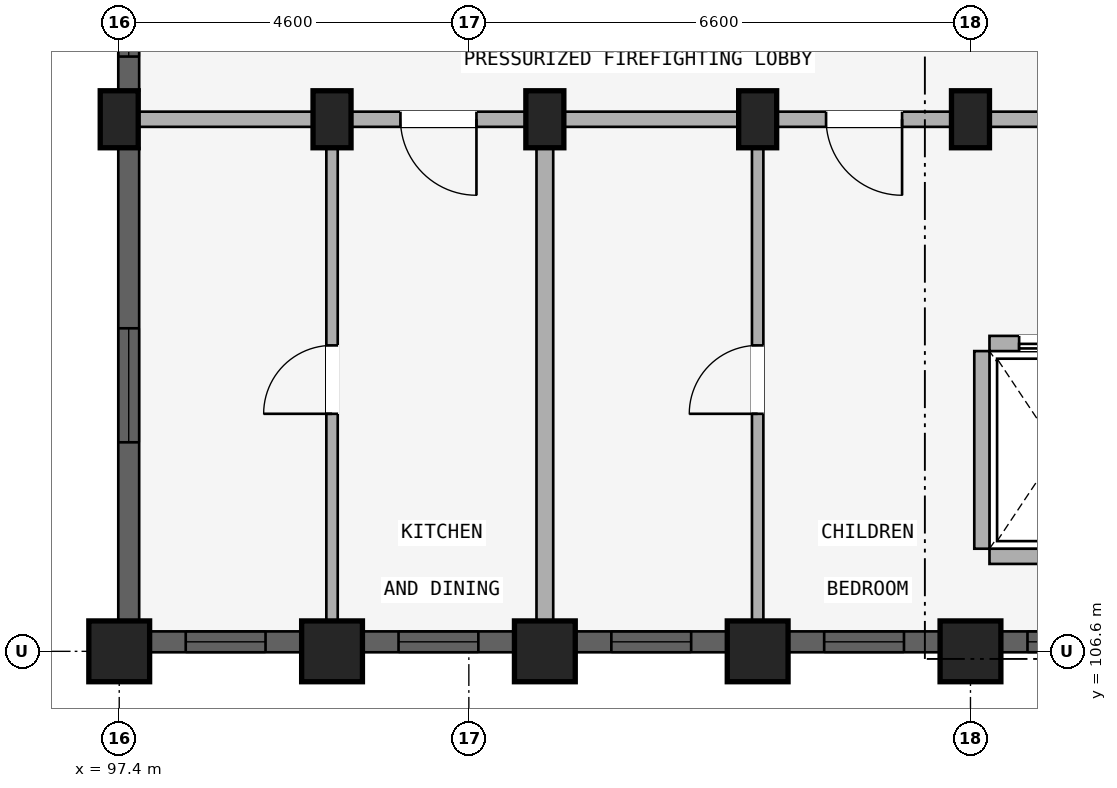
"""IFC4 building model, lengths in metres.
Left out: names, types, materials, properties, quantities, classifications, styles, units other than length and angle.
Written with IfcOpenShell. Run it as: python <this file> out.ifc"""

import sys

from ifc_helpers import new_model, si_unit, direction, frame, frame_2d, origin, origin_2d, place, context, subcontext, project, spatial, rectangle, extrude, element, fill, save


model = new_model("IFC4")
c1 = context("Model", 3, precision=1e-05, world=origin(), true_north=direction((0.0, 1.0)))
c2 = subcontext(c1, "Body", "Model", "MODEL_VIEW")
j1 = project(units=[si_unit("LENGTHUNIT", "METRE"), si_unit("PLANEANGLEUNIT", "RADIAN")], contexts=[c1])
p1 = place(None, origin())
s1 = spatial("IfcSite", under=j1, at=p1, CompositionType="ELEMENT")
p2 = place(p1, origin())
s2 = spatial("IfcBuilding", under=s1, at=p2, CompositionType="ELEMENT")
p3 = place(p2, frame((0.0, 0.0, 8.7)))
s3 = spatial("IfcBuildingStorey", under=s2, at=p3, CompositionType="ELEMENT", Elevation=8.7)
p4 = place(p3, frame((108.6, 106.6, 0.0), z_axis=(0.0, 0.0, 1.0), x_axis=(1.0, 0.0, 0.0)))
e1 = element("IfcColumn", 1, at=p4, inside=s3, PredefinedType="COLUMN", context=c2, shape_type="SweptSolid", body=[
    extrude(rectangle(XDim=0.8, YDim=0.8, at=origin_2d()), origin(), (0.0, 0.0, 1.0), 2.93),
])
p5 = place(p3, frame((108.6, 113.6, 0.0), z_axis=(0.0, 0.0, 1.0), x_axis=(1.0, 0.0, 0.0)))
e2 = element("IfcColumn", 2, at=p5, inside=s3, PredefinedType="COLUMN", context=c2, shape_type="SweptSolid", body=[
    extrude(rectangle(XDim=0.5, YDim=0.75, at=origin_2d()), origin(), (0.0, 0.0, 1.0), 2.93),
])
p6 = place(p3, frame((105.8, 106.6, 0.0), z_axis=(0.0, 0.0, 1.0), x_axis=(1.0, 0.0, 0.0)))
e3 = element("IfcColumn", 3, at=p6, inside=s3, PredefinedType="COLUMN", context=c2, shape_type="SweptSolid", body=[
    extrude(rectangle(XDim=0.8, YDim=0.8, at=origin_2d()), origin(), (0.0, 0.0, 1.0), 2.93),
])
p7 = place(p3, frame((105.8, 113.6, 0.0), z_axis=(0.0, 0.0, 1.0), x_axis=(1.0, 0.0, 0.0)))
e4 = element("IfcColumn", 4, at=p7, inside=s3, PredefinedType="COLUMN", context=c2, shape_type="SweptSolid", body=[
    extrude(rectangle(XDim=0.5, YDim=0.75, at=origin_2d()), origin(), (0.0, 0.0, 1.0), 2.93),
])
p8 = place(p3, frame((103.0, 106.6, 0.0), z_axis=(0.0, 0.0, 1.0), x_axis=(1.0, 0.0, 0.0)))
e5 = element("IfcColumn", 5, at=p8, inside=s3, PredefinedType="COLUMN", context=c2, shape_type="SweptSolid", body=[
    extrude(rectangle(XDim=0.8, YDim=0.8, at=origin_2d()), origin(), (0.0, 0.0, 1.0), 2.93),
])
p9 = place(p3, frame((103.0, 113.6, 0.0), z_axis=(0.0, 0.0, 1.0), x_axis=(1.0, 0.0, 0.0)))
e6 = element("IfcColumn", 6, at=p9, inside=s3, PredefinedType="COLUMN", context=c2, shape_type="SweptSolid", body=[
    extrude(rectangle(XDim=0.5, YDim=0.75, at=origin_2d()), origin(), (0.0, 0.0, 1.0), 2.93),
])
p10 = place(p3, frame((100.2, 106.6, 0.0), z_axis=(0.0, 0.0, 1.0), x_axis=(1.0, 0.0, 0.0)))
e7 = element("IfcColumn", 7, at=p10, inside=s3, PredefinedType="COLUMN", context=c2, shape_type="SweptSolid", body=[
    extrude(rectangle(XDim=0.8, YDim=0.8, at=origin_2d()), origin(), (0.0, 0.0, 1.0), 2.93),
])
p11 = place(p3, frame((100.2, 113.6, 0.0), z_axis=(0.0, 0.0, 1.0), x_axis=(1.0, 0.0, 0.0)))
e8 = element("IfcColumn", 8, at=p11, inside=s3, PredefinedType="COLUMN", context=c2, shape_type="SweptSolid", body=[
    extrude(rectangle(XDim=0.5, YDim=0.75, at=origin_2d()), origin(), (0.0, 0.0, 1.0), 2.93),
])
p12 = place(p3, frame((97.4, 106.6, 0.0), z_axis=(0.0, 0.0, 1.0), x_axis=(1.0, 0.0, 0.0)))
e9 = element("IfcColumn", 9, at=p12, inside=s3, PredefinedType="COLUMN", context=c2, shape_type="SweptSolid", body=[
    extrude(rectangle(XDim=0.8, YDim=0.8, at=origin_2d()), origin(), (0.0, 0.0, 1.0), 2.93),
])
p13 = place(p3, frame((97.4, 113.6, 0.0), z_axis=(0.0, 0.0, 1.0), x_axis=(1.0, 0.0, 0.0)))
e10 = element("IfcColumn", 10, at=p13, inside=s3, PredefinedType="COLUMN", context=c2, shape_type="SweptSolid", body=[
    extrude(rectangle(XDim=0.5, YDim=0.75, at=origin_2d()), origin(), (0.0, 0.0, 1.0), 2.93),
])
p14 = place(p3, frame((108.75, 107.95, 0.0), z_axis=(0.0, 0.0, 1.0), x_axis=(0.0, 1.0, 0.0)))
e11 = element("IfcWall", 11, at=p14, inside=s3, PredefinedType="STANDARD", context=c2, shape_type="SweptSolid", body=[
    extrude(rectangle(XDim=2.6, YDim=0.2, at=frame_2d((1.3, 0.0))), origin(), (0.0, 0.0, 1.0), 2.372),
])
p15 = place(p3, frame((110.65, 107.85, 0.0), z_axis=(0.0, 0.0, 1.0), x_axis=(-1.0, 0.0, 0.0)))
e12 = element("IfcWall", 12, at=p15, inside=s3, PredefinedType="STANDARD", context=c2, shape_type="SweptSolid", body=[
    extrude(rectangle(XDim=1.8, YDim=0.2, at=frame_2d((0.9, 0.0))), origin(), (0.0, 0.0, 1.0), 2.93),
])
p16 = place(p3, frame((110.65, 110.65, 0.0), z_axis=(0.0, 0.0, 1.0), x_axis=(-1.0, 0.0, 0.0)))
e13 = element("IfcWall", 13, at=p16, inside=s3, PredefinedType="STANDARD", context=c2, shape_type="SweptSolid", body=[
    extrude(rectangle(XDim=1.8, YDim=0.2, at=frame_2d((0.9, 0.0))), origin(), (0.0, 0.0, 1.0), 2.93),
])
p17 = place(p16, frame((0.39, 0.0, 0.0)))
e14 = element("IfcOpeningElement", 14, at=p17, cuts=e13, PredefinedType="OPENING", context=c2, shape_type="SweptSolid", body=[
    extrude(rectangle(XDim=1.02, YDim=2.15, at=frame_2d((0.51, 1.075))), frame((0.0, 0.11, 0.0), z_axis=(0.0, -1.0, 0.0), x_axis=(1.0, 0.0, 0.0)), (0.0, 0.0, 1.0), 0.22),
])
p18 = place(p3, frame((114.25, 113.6, 0.0), z_axis=(0.0, 0.0, 1.0), x_axis=(-1.0, 0.0, 0.0)))
e15 = element("IfcWall", 15, at=p18, inside=s3, PredefinedType="STANDARD", context=c2, shape_type="SweptSolid", body=[
    extrude(rectangle(XDim=5.6, YDim=0.2, at=frame_2d((2.8, 0.0))), origin(), (0.0, 0.0, 1.0), 2.372),
])
p19 = place(p18, frame((1.91, 0.0, 0.0)))
e16 = element("IfcOpeningElement", 16, at=p19, cuts=e15, PredefinedType="OPENING", context=c2, shape_type="SweptSolid", body=[
    extrude(rectangle(XDim=1.22, YDim=2.15, at=frame_2d((0.61, 1.075))), frame((0.0, 0.11, 0.0), z_axis=(0.0, -1.0, 0.0), x_axis=(1.0, 0.0, 0.0)), (0.0, 0.0, 1.0), 0.22),
])
p20 = place(p3, frame((108.6, 113.6, 0.0), z_axis=(0.0, 0.0, 1.0), x_axis=(-1.0, 0.0, 0.0)))
e17 = element("IfcWall", 17, at=p20, inside=s3, PredefinedType="STANDARD", context=c2, shape_type="SweptSolid", body=[
    extrude(rectangle(XDim=2.8, YDim=0.2, at=frame_2d((1.4, 0.0))), origin(), (0.0, 0.0, 1.0), 2.372),
])
p21 = place(p20, frame((0.9, 0.0, 0.0)))
e18 = element("IfcOpeningElement", 18, at=p21, cuts=e17, PredefinedType="OPENING", context=c2, shape_type="SweptSolid", body=[
    extrude(rectangle(XDim=1.0, YDim=2.15, at=frame_2d((0.5, 1.075))), frame((0.0, 0.11, 0.0), z_axis=(0.0, -1.0, 0.0), x_axis=(1.0, 0.0, 0.0)), (0.0, 0.0, 1.0), 0.22),
])
p22 = place(p3, frame((105.8, 113.6, 0.0), z_axis=(0.0, 0.0, 1.0), x_axis=(-1.0, 0.0, 0.0)))
e19 = element("IfcWall", 19, at=p22, inside=s3, PredefinedType="STANDARD", context=c2, shape_type="SweptSolid", body=[
    extrude(rectangle(XDim=2.8, YDim=0.2, at=frame_2d((1.4, 0.0))), origin(), (0.0, 0.0, 1.0), 2.372),
])
p23 = place(p3, frame((103.0, 113.6, 0.0), z_axis=(0.0, 0.0, 1.0), x_axis=(-1.0, 0.0, 0.0)))
e20 = element("IfcWall", 20, at=p23, inside=s3, PredefinedType="STANDARD", context=c2, shape_type="SweptSolid", body=[
    extrude(rectangle(XDim=2.8, YDim=0.2, at=frame_2d((1.4, 0.0))), origin(), (0.0, 0.0, 1.0), 2.372),
])
p24 = place(p23, frame((0.9, 0.0, 0.0)))
e21 = element("IfcOpeningElement", 21, at=p24, cuts=e20, PredefinedType="OPENING", context=c2, shape_type="SweptSolid", body=[
    extrude(rectangle(XDim=1.0, YDim=2.15, at=frame_2d((0.5, 1.075))), frame((0.0, 0.11, 0.0), z_axis=(0.0, -1.0, 0.0), x_axis=(1.0, 0.0, 0.0)), (0.0, 0.0, 1.0), 0.22),
])
p25 = place(p3, frame((100.2, 113.6, 0.0), z_axis=(0.0, 0.0, 1.0), x_axis=(-1.0, 0.0, 0.0)))
e22 = element("IfcWall", 22, at=p25, inside=s3, PredefinedType="STANDARD", context=c2, shape_type="SweptSolid", body=[
    extrude(rectangle(XDim=2.8, YDim=0.2, at=frame_2d((1.4, 0.0))), origin(), (0.0, 0.0, 1.0), 2.372),
])
p26 = place(p3, frame((105.8, 106.8, 0.0), z_axis=(0.0, 0.0, 1.0), x_axis=(0.0, 1.0, 0.0)))
e23 = element("IfcWall", 23, at=p26, inside=s3, PredefinedType="PARTITIONING", context=c2, shape_type="SweptSolid", body=[
    extrude(rectangle(XDim=6.75, YDim=0.15, at=frame_2d((3.375, 0.0))), origin(), (0.0, 0.0, 1.0), 2.372),
])
p27 = place(p26, frame((2.925, 0.0, 0.0)))
e24 = element("IfcOpeningElement", 24, at=p27, cuts=e23, PredefinedType="OPENING", context=c2, shape_type="SweptSolid", body=[
    extrude(rectangle(XDim=0.9, YDim=2.1, at=frame_2d((0.45, 1.05))), frame((0.0, 0.085, 0.0), z_axis=(0.0, -1.0, 0.0), x_axis=(1.0, 0.0, 0.0)), (0.0, 0.0, 1.0), 0.17),
])
p28 = place(p3, frame((103.0, 106.8, 0.0), z_axis=(0.0, 0.0, 1.0), x_axis=(0.0, 1.0, 0.0)))
e25 = element("IfcWall", 25, at=p28, inside=s3, PredefinedType="STANDARD", context=c2, shape_type="SweptSolid", body=[
    extrude(rectangle(XDim=6.75, YDim=0.22, at=frame_2d((3.375, 0.0))), origin(), (0.0, 0.0, 1.0), 2.372),
])
p29 = place(p3, frame((100.2, 106.8, 0.0), z_axis=(0.0, 0.0, 1.0), x_axis=(0.0, 1.0, 0.0)))
e26 = element("IfcWall", 26, at=p29, inside=s3, PredefinedType="PARTITIONING", context=c2, shape_type="SweptSolid", body=[
    extrude(rectangle(XDim=6.75, YDim=0.15, at=frame_2d((3.375, 0.0))), origin(), (0.0, 0.0, 1.0), 2.372),
])
p30 = place(p29, frame((2.925, 0.0, 0.0)))
e27 = element("IfcOpeningElement", 27, at=p30, cuts=e26, PredefinedType="OPENING", context=c2, shape_type="SweptSolid", body=[
    extrude(rectangle(XDim=0.9, YDim=2.1, at=frame_2d((0.45, 1.05))), frame((0.0, 0.085, 0.0), z_axis=(0.0, -1.0, 0.0), x_axis=(1.0, 0.0, 0.0)), (0.0, 0.0, 1.0), 0.17),
])
p31 = place(p3, frame((111.372, 106.725, 0.0), z_axis=(0.0, 0.0, 1.0), x_axis=(-1.0, 0.0, 0.0)))
e28 = element("IfcWall", 28, at=p31, inside=s3, PredefinedType="STANDARD", context=c2, shape_type="SweptSolid", body=[
    extrude(rectangle(XDim=2.422, YDim=0.275, at=frame_2d((1.211, 0.0))), origin(), (0.0, 0.0, 1.0), 2.472),
])
p32 = place(p31, frame((0.822, 0.0, 0.772)))
e29 = element("IfcOpeningElement", 29, at=p32, cuts=e28, PredefinedType="OPENING", context=c2, shape_type="SweptSolid", body=[
    extrude(rectangle(XDim=1.2, YDim=1.5, at=frame_2d((0.6, 0.75))), frame((0.0, 0.147, 0.0), z_axis=(0.0, -1.0, 0.0), x_axis=(1.0, 0.0, 0.0)), (0.0, 0.0, 1.0), 0.295),
])
p33 = place(p3, frame((108.197, 106.725, 0.0), z_axis=(0.0, 0.0, 1.0), x_axis=(-1.0, 0.0, 0.0)))
e30 = element("IfcWall", 30, at=p33, inside=s3, PredefinedType="STANDARD", context=c2, shape_type="SweptSolid", body=[
    extrude(rectangle(XDim=1.993, YDim=0.275, at=frame_2d((0.997, 0.0))), origin(), (0.0, 0.0, 1.0), 2.472),
])
p34 = place(p33, frame((0.471, 0.0, 0.88)))
e31 = element("IfcOpeningElement", 31, at=p34, cuts=e30, PredefinedType="OPENING", context=c2, shape_type="SweptSolid", body=[
    extrude(rectangle(XDim=1.05, YDim=1.25, at=frame_2d((0.525, 0.625))), frame((0.0, 0.147, 0.0), z_axis=(0.0, -1.0, 0.0), x_axis=(1.0, 0.0, 0.0)), (0.0, 0.0, 1.0), 0.295),
])
p35 = place(p3, frame((105.396, 106.725, 0.0), z_axis=(0.0, 0.0, 1.0), x_axis=(-1.0, 0.0, 0.0)))
e32 = element("IfcWall", 32, at=p35, inside=s3, PredefinedType="STANDARD", context=c2, shape_type="SweptSolid", body=[
    extrude(rectangle(XDim=1.993, YDim=0.275, at=frame_2d((0.997, 0.0))), origin(), (0.0, 0.0, 1.0), 2.472),
])
p36 = place(p35, frame((0.471, 0.0, 0.88)))
e33 = element("IfcOpeningElement", 33, at=p36, cuts=e32, PredefinedType="OPENING", context=c2, shape_type="SweptSolid", body=[
    extrude(rectangle(XDim=1.05, YDim=1.25, at=frame_2d((0.525, 0.625))), frame((0.0, 0.147, 0.0), z_axis=(0.0, -1.0, 0.0), x_axis=(1.0, 0.0, 0.0)), (0.0, 0.0, 1.0), 0.295),
])
p37 = place(p3, frame((102.596, 106.725, 0.0), z_axis=(0.0, 0.0, 1.0), x_axis=(-1.0, 0.0, 0.0)))
e34 = element("IfcWall", 34, at=p37, inside=s3, PredefinedType="STANDARD", context=c2, shape_type="SweptSolid", body=[
    extrude(rectangle(XDim=1.993, YDim=0.275, at=frame_2d((0.997, 0.0))), origin(), (0.0, 0.0, 1.0), 2.472),
])
p38 = place(p37, frame((0.471, 0.0, 0.88)))
e35 = element("IfcOpeningElement", 35, at=p38, cuts=e34, PredefinedType="OPENING", context=c2, shape_type="SweptSolid", body=[
    extrude(rectangle(XDim=1.05, YDim=1.25, at=frame_2d((0.525, 0.625))), frame((0.0, 0.147, 0.0), z_axis=(0.0, -1.0, 0.0), x_axis=(1.0, 0.0, 0.0)), (0.0, 0.0, 1.0), 0.295),
])
p39 = place(p3, frame((99.796, 106.725, 0.0), z_axis=(0.0, 0.0, 1.0), x_axis=(-1.0, 0.0, 0.0)))
e36 = element("IfcWall", 36, at=p39, inside=s3, PredefinedType="STANDARD", context=c2, shape_type="SweptSolid", body=[
    extrude(rectangle(XDim=1.993, YDim=0.275, at=frame_2d((0.997, 0.0))), origin(), (0.0, 0.0, 1.0), 2.472),
])
p40 = place(p39, frame((0.471, 0.0, 0.88)))
e37 = element("IfcOpeningElement", 37, at=p40, cuts=e36, PredefinedType="OPENING", context=c2, shape_type="SweptSolid", body=[
    extrude(rectangle(XDim=1.05, YDim=1.25, at=frame_2d((0.525, 0.625))), frame((0.0, 0.147, 0.0), z_axis=(0.0, -1.0, 0.0), x_axis=(1.0, 0.0, 0.0)), (0.0, 0.0, 1.0), 0.295),
])
p41 = place(p3, frame((97.525, 107.003, 0.0), z_axis=(0.0, 0.0, 1.0), x_axis=(0.0, 1.0, 0.0)))
e38 = element("IfcWall", 38, at=p41, inside=s3, PredefinedType="STANDARD", context=c2, shape_type="SweptSolid", body=[
    extrude(rectangle(XDim=6.218, YDim=0.275, at=frame_2d((3.109, 0.0))), origin(), (0.0, 0.0, 1.0), 2.372),
])
p42 = place(p41, frame((2.346, 0.0, 0.522)))
e39 = element("IfcOpeningElement", 39, at=p42, cuts=e38, PredefinedType="OPENING", context=c2, shape_type="SweptSolid", body=[
    extrude(rectangle(XDim=1.5, YDim=1.65, at=frame_2d((0.75, 0.825))), frame((0.0, 0.147, 0.0), z_axis=(0.0, -1.0, 0.0), x_axis=(1.0, 0.0, 0.0)), (0.0, 0.0, 1.0), 0.295),
])
p43 = place(p3, frame((97.525, 113.979, 0.0), z_axis=(0.0, 0.0, 1.0), x_axis=(0.0, 1.0, 0.0)))
e40 = element("IfcWall", 40, at=p43, inside=s3, PredefinedType="STANDARD", context=c2, shape_type="SweptSolid", body=[
    extrude(rectangle(XDim=1.643, YDim=0.275, at=frame_2d((0.822, 0.0))), origin(), (0.0, 0.0, 1.0), 2.372),
])
p44 = place(p43, frame((0.447, 0.0, 0.88)))
e41 = element("IfcOpeningElement", 41, at=p44, cuts=e40, PredefinedType="OPENING", context=c2, shape_type="SweptSolid", body=[
    extrude(rectangle(XDim=0.75, YDim=1.05, at=frame_2d((0.375, 0.525))), frame((0.0, 0.147, 0.0), z_axis=(0.0, -1.0, 0.0), x_axis=(1.0, 0.0, 0.0)), (0.0, 0.0, 1.0), 0.295),
])
p45 = place(p32, origin())
e42 = element("IfcWindow", 42, at=p45, inside=s3, PartitioningType="SINGLE_PANEL", PredefinedType="WINDOW", context=c2, shape_type="SweptSolid", body=[
    extrude(rectangle(XDim=1.2, YDim=1.5, at=frame_2d((0.6, 0.75))), frame((0.0, 0.03, 0.0), z_axis=(0.0, -1.0, 0.0), x_axis=(1.0, 0.0, 0.0)), (0.0, 0.0, 1.0), 0.06),
])
fill(e29, e42)
p46 = place(p34, origin())
e43 = element("IfcWindow", 43, at=p46, inside=s3, PartitioningType="SINGLE_PANEL", PredefinedType="WINDOW", context=c2, shape_type="SweptSolid", body=[
    extrude(rectangle(XDim=1.05, YDim=1.25, at=frame_2d((0.525, 0.625))), frame((0.0, 0.03, 0.0), z_axis=(0.0, -1.0, 0.0), x_axis=(1.0, 0.0, 0.0)), (0.0, 0.0, 1.0), 0.06),
])
fill(e31, e43)
p47 = place(p36, origin())
e44 = element("IfcWindow", 44, at=p47, inside=s3, PartitioningType="SINGLE_PANEL", PredefinedType="WINDOW", context=c2, shape_type="SweptSolid", body=[
    extrude(rectangle(XDim=1.05, YDim=1.25, at=frame_2d((0.525, 0.625))), frame((0.0, 0.03, 0.0), z_axis=(0.0, -1.0, 0.0), x_axis=(1.0, 0.0, 0.0)), (0.0, 0.0, 1.0), 0.06),
])
fill(e33, e44)
p48 = place(p38, origin())
e45 = element("IfcWindow", 45, at=p48, inside=s3, PartitioningType="SINGLE_PANEL", PredefinedType="WINDOW", context=c2, shape_type="SweptSolid", body=[
    extrude(rectangle(XDim=1.05, YDim=1.25, at=frame_2d((0.525, 0.625))), frame((0.0, 0.03, 0.0), z_axis=(0.0, -1.0, 0.0), x_axis=(1.0, 0.0, 0.0)), (0.0, 0.0, 1.0), 0.06),
])
fill(e35, e45)
p49 = place(p40, origin())
e46 = element("IfcWindow", 46, at=p49, inside=s3, PartitioningType="SINGLE_PANEL", PredefinedType="WINDOW", context=c2, shape_type="SweptSolid", body=[
    extrude(rectangle(XDim=1.05, YDim=1.25, at=frame_2d((0.525, 0.625))), frame((0.0, 0.03, 0.0), z_axis=(0.0, -1.0, 0.0), x_axis=(1.0, 0.0, 0.0)), (0.0, 0.0, 1.0), 0.06),
])
fill(e37, e46)
p50 = place(p42, origin())
e47 = element("IfcWindow", 47, at=p50, inside=s3, PartitioningType="DOUBLE_PANEL_VERTICAL", PredefinedType="WINDOW", context=c2, shape_type="SweptSolid", body=[
    extrude(rectangle(XDim=1.5, YDim=1.65, at=frame_2d((0.75, 0.825))), frame((0.0, 0.03, 0.0), z_axis=(0.0, -1.0, 0.0), x_axis=(1.0, 0.0, 0.0)), (0.0, 0.0, 1.0), 0.06),
])
fill(e39, e47)
p51 = place(p44, origin())
e48 = element("IfcWindow", 48, at=p51, inside=s3, PartitioningType="SINGLE_PANEL", PredefinedType="WINDOW", context=c2, shape_type="SweptSolid", body=[
    extrude(rectangle(XDim=0.75, YDim=1.05, at=frame_2d((0.375, 0.525))), frame((0.0, 0.03, 0.0), z_axis=(0.0, -1.0, 0.0), x_axis=(1.0, 0.0, 0.0)), (0.0, 0.0, 1.0), 0.06),
])
fill(e41, e48)
p52 = place(p17, origin())
e49 = element("IfcDoor", 49, at=p52, inside=s3, OperationType="SLIDING_TO_RIGHT", PredefinedType="DOOR", context=c2, shape_type="SweptSolid", body=[
    extrude(rectangle(XDim=1.02, YDim=2.15, at=frame_2d((0.51, 1.075))), frame((0.0, 0.025, 0.0), z_axis=(0.0, -1.0, 0.0), x_axis=(1.0, 0.0, 0.0)), (0.0, 0.0, 1.0), 0.05),
])
fill(e14, e49)
p53 = place(p21, origin())
e50 = element("IfcDoor", 50, at=p53, inside=s3, OperationType="SINGLE_SWING_LEFT", PredefinedType="DOOR", context=c2, shape_type="SweptSolid", body=[
    extrude(rectangle(XDim=1.0, YDim=2.15, at=frame_2d((0.5, 1.075))), frame((0.0, 0.025, 0.0), z_axis=(0.0, -1.0, 0.0), x_axis=(1.0, 0.0, 0.0)), (0.0, 0.0, 1.0), 0.05),
])
fill(e18, e50)
p54 = place(p24, origin())
e51 = element("IfcDoor", 51, at=p54, inside=s3, OperationType="SINGLE_SWING_LEFT", PredefinedType="DOOR", context=c2, shape_type="SweptSolid", body=[
    extrude(rectangle(XDim=1.0, YDim=2.15, at=frame_2d((0.5, 1.075))), frame((0.0, 0.025, 0.0), z_axis=(0.0, -1.0, 0.0), x_axis=(1.0, 0.0, 0.0)), (0.0, 0.0, 1.0), 0.05),
])
fill(e21, e51)
p55 = place(p27, frame((0.9, 0.0, 0.0), z_axis=(0.0, 0.0, 1.0), x_axis=(-1.0, 0.0, 0.0)))
e52 = element("IfcDoor", 52, at=p55, inside=s3, OperationType="SINGLE_SWING_RIGHT", PredefinedType="DOOR", context=c2, shape_type="SweptSolid", body=[
    extrude(rectangle(XDim=0.9, YDim=2.1, at=frame_2d((0.45, 1.05))), frame((0.0, 0.025, 0.0), z_axis=(0.0, -1.0, 0.0), x_axis=(1.0, 0.0, 0.0)), (0.0, 0.0, 1.0), 0.05),
])
fill(e24, e52)
p56 = place(p30, origin())
e53 = element("IfcDoor", 53, at=p56, inside=s3, OperationType="SINGLE_SWING_LEFT", PredefinedType="DOOR", context=c2, shape_type="SweptSolid", body=[
    extrude(rectangle(XDim=0.9, YDim=2.1, at=frame_2d((0.45, 1.05))), frame((0.0, 0.025, 0.0), z_axis=(0.0, -1.0, 0.0), x_axis=(1.0, 0.0, 0.0)), (0.0, 0.0, 1.0), 0.05),
])
fill(e27, e53)
save(model, sys.argv[1])
